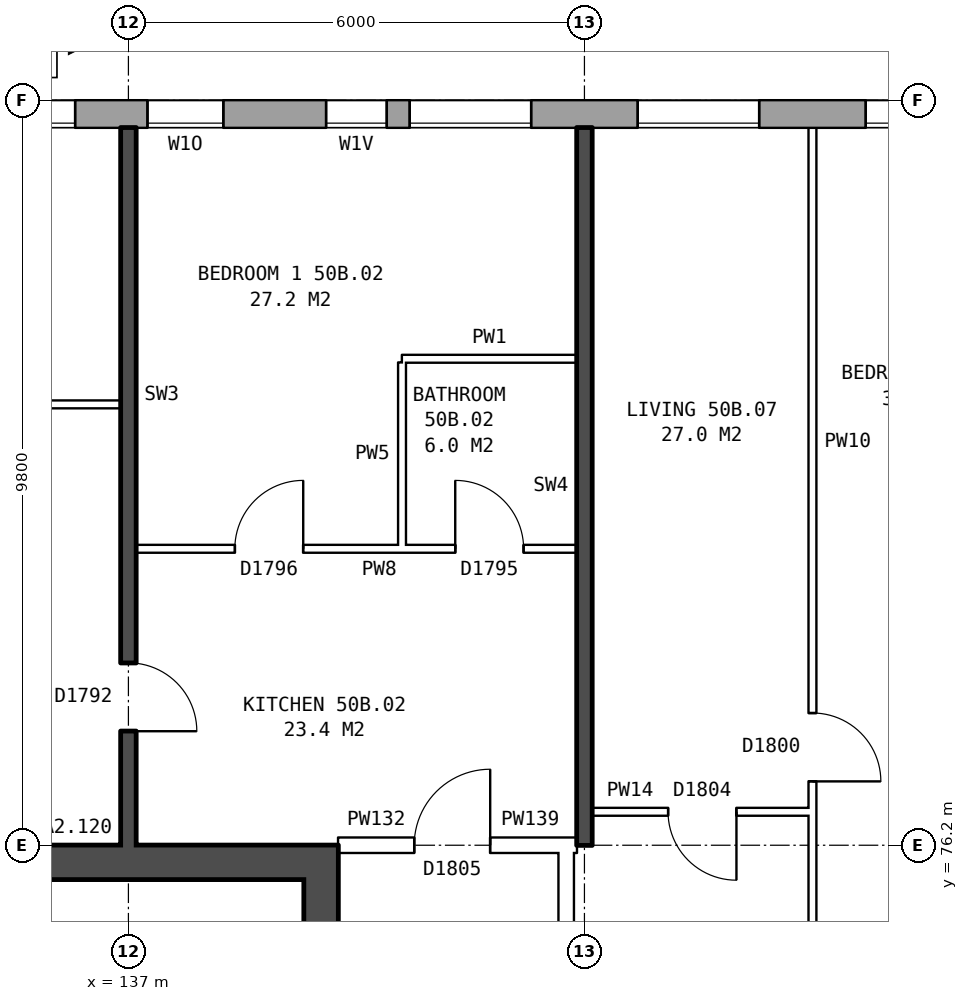
"""IFC4 building model, lengths in metres.
Left out: names, types, materials, properties, quantities, classifications, styles, units other than length and angle.
Written with IfcOpenShell. Run it as: python <this file> out.ifc"""

import sys

from ifc_helpers import new_model, si_unit, direction, frame, frame_2d, origin, place, context, subcontext, project, spatial, rectangle, extrude, element, fill, save


model = new_model("IFC4")
c1 = context("Model", 3, precision=1e-05, world=origin(), true_north=direction((0.0, 1.0)))
c2 = subcontext(c1, "Body", "Model", "MODEL_VIEW")
j1 = project(units=[si_unit("LENGTHUNIT", "METRE"), si_unit("PLANEANGLEUNIT", "RADIAN")], contexts=[c1])
p1 = place(None, origin())
s1 = spatial("IfcSite", under=j1, at=p1, CompositionType="ELEMENT")
p2 = place(p1, origin())
s2 = spatial("IfcBuilding", under=s1, at=p2, CompositionType="ELEMENT")
p3 = place(p2, frame((0.0, 0.0, 178.9)))
s3 = spatial("IfcBuildingStorey", under=s2, at=p3, CompositionType="ELEMENT", Elevation=178.9)
p4 = place(p3, frame((167.175, 85.82, 0.0), z_axis=(0.0, 0.0, 1.0), x_axis=(-1.0, 0.0, 0.0)))
e1 = element("IfcWall", 1, at=p4, inside=s3, PredefinedType="STANDARD", context=c2, shape_type="SweptSolid", body=[
    extrude(rectangle(XDim=33.101, YDim=0.36, at=frame_2d((16.55, 0.0))), origin(), (0.0, 0.0, 1.0), 2.85),
])
p5 = place(p4, frame((0.875, 0.0, 0.8)))
e2 = element("IfcOpeningElement", 2, at=p5, cuts=e1, PredefinedType="OPENING", context=c2, shape_type="SweptSolid", body=[
    extrude(rectangle(XDim=1.6, YDim=1.8, at=frame_2d((0.8, 0.9))), frame((0.0, 0.19, 0.0), z_axis=(0.0, -1.0, 0.0), x_axis=(1.0, 0.0, 0.0)), (0.0, 0.0, 1.0), 0.38),
])
p6 = place(p4, frame((2.8, 0.0, 1.4)))
e3 = element("IfcOpeningElement", 3, at=p6, cuts=e1, PredefinedType="OPENING", context=c2, shape_type="SweptSolid", body=[
    extrude(rectangle(XDim=1.4, YDim=1.2, at=frame_2d((0.7, 0.6))), frame((0.0, 0.19, 0.0), z_axis=(0.0, -1.0, 0.0), x_axis=(1.0, 0.0, 0.0)), (0.0, 0.0, 1.0), 0.38),
])
p7 = place(p4, frame((6.875, 0.0, 0.8)))
e4 = element("IfcOpeningElement", 4, at=p7, cuts=e1, PredefinedType="OPENING", context=c2, shape_type="SweptSolid", body=[
    extrude(rectangle(XDim=1.6, YDim=1.8, at=frame_2d((0.8, 0.9))), frame((0.0, 0.19, 0.0), z_axis=(0.0, -1.0, 0.0), x_axis=(1.0, 0.0, 0.0)), (0.0, 0.0, 1.0), 0.38),
])
p8 = place(p4, frame((9.875, 0.0, 0.8)))
e5 = element("IfcOpeningElement", 5, at=p8, cuts=e1, PredefinedType="OPENING", context=c2, shape_type="SweptSolid", body=[
    extrude(rectangle(XDim=1.6, YDim=1.8, at=frame_2d((0.8, 0.9))), frame((0.0, 0.19, 0.0), z_axis=(0.0, -1.0, 0.0), x_axis=(1.0, 0.0, 0.0)), (0.0, 0.0, 1.0), 0.38),
])
p9 = place(p4, frame((12.875, 0.0, 0.8)))
e6 = element("IfcOpeningElement", 6, at=p9, cuts=e1, PredefinedType="OPENING", context=c2, shape_type="SweptSolid", body=[
    extrude(rectangle(XDim=1.6, YDim=1.8, at=frame_2d((0.8, 0.9))), frame((0.0, 0.19, 0.0), z_axis=(0.0, -1.0, 0.0), x_axis=(1.0, 0.0, 0.0)), (0.0, 0.0, 1.0), 0.38),
])
p10 = place(p4, frame((15.875, 0.0, 0.8)))
e7 = element("IfcOpeningElement", 7, at=p10, cuts=e1, PredefinedType="OPENING", context=c2, shape_type="SweptSolid", body=[
    extrude(rectangle(XDim=1.6, YDim=1.8, at=frame_2d((0.8, 0.9))), frame((0.0, 0.19, 0.0), z_axis=(0.0, -1.0, 0.0), x_axis=(1.0, 0.0, 0.0)), (0.0, 0.0, 1.0), 0.38),
])
p11 = place(p4, frame((18.875, 0.0, 0.8)))
e8 = element("IfcOpeningElement", 8, at=p11, cuts=e1, PredefinedType="OPENING", context=c2, shape_type="SweptSolid", body=[
    extrude(rectangle(XDim=1.6, YDim=1.8, at=frame_2d((0.8, 0.9))), frame((0.0, 0.19, 0.0), z_axis=(0.0, -1.0, 0.0), x_axis=(1.0, 0.0, 0.0)), (0.0, 0.0, 1.0), 0.38),
])
p12 = place(p4, frame((21.875, 0.0, 0.8)))
e9 = element("IfcOpeningElement", 9, at=p12, cuts=e1, PredefinedType="OPENING", context=c2, shape_type="SweptSolid", body=[
    extrude(rectangle(XDim=1.6, YDim=1.8, at=frame_2d((0.8, 0.9))), frame((0.0, 0.19, 0.0), z_axis=(0.0, -1.0, 0.0), x_axis=(1.0, 0.0, 0.0)), (0.0, 0.0, 1.0), 0.38),
])
p13 = place(p4, frame((24.875, 0.0, 0.8)))
e10 = element("IfcOpeningElement", 10, at=p13, cuts=e1, PredefinedType="OPENING", context=c2, shape_type="SweptSolid", body=[
    extrude(rectangle(XDim=1.6, YDim=1.8, at=frame_2d((0.8, 0.9))), frame((0.0, 0.19, 0.0), z_axis=(0.0, -1.0, 0.0), x_axis=(1.0, 0.0, 0.0)), (0.0, 0.0, 1.0), 0.38),
])
p14 = place(p4, frame((26.775, 0.0, 0.8)))
e11 = element("IfcOpeningElement", 11, at=p14, cuts=e1, PredefinedType="OPENING", context=c2, shape_type="SweptSolid", body=[
    extrude(rectangle(XDim=0.8, YDim=0.9, at=frame_2d((0.4, 0.45))), frame((0.0, 0.19, 0.0), z_axis=(0.0, -1.0, 0.0), x_axis=(1.0, 0.0, 0.0)), (0.0, 0.0, 1.0), 0.38),
])
p15 = place(p4, frame((30.875, 0.0, 0.8)))
e12 = element("IfcOpeningElement", 12, at=p15, cuts=e1, PredefinedType="OPENING", context=c2, shape_type="SweptSolid", body=[
    extrude(rectangle(XDim=1.6, YDim=1.8, at=frame_2d((0.8, 0.9))), frame((0.0, 0.19, 0.0), z_axis=(0.0, -1.0, 0.0), x_axis=(1.0, 0.0, 0.0)), (0.0, 0.0, 1.0), 0.38),
])
p16 = place(p4, frame((28.925, 0.0, 1.4)))
e13 = element("IfcOpeningElement", 13, at=p16, cuts=e1, PredefinedType="OPENING", context=c2, shape_type="SweptSolid", body=[
    extrude(rectangle(XDim=1.0, YDim=1.2, at=frame_2d((0.5, 0.6))), frame((0.0, 0.19, 0.0), z_axis=(0.0, -1.0, 0.0), x_axis=(1.0, 0.0, 0.0)), (0.0, 0.0, 1.0), 0.38),
])
p17 = place(p3, frame((139.535, 63.8, 0.0), z_axis=(0.0, 0.0, 1.0), x_axis=(0.0, 1.0, 0.0)))
e14 = element("IfcWall", 14, at=p17, inside=s3, PredefinedType="SHEAR", context=c2, shape_type="SweptSolid", body=[
    extrude(rectangle(XDim=12.4, YDim=0.45, at=frame_2d((6.2, 0.0))), origin(), (0.0, 0.0, 1.0), 2.85),
])
p18 = place(p17, frame((1.325, 0.0, 0.0)))
e15 = element("IfcOpeningElement", 15, at=p18, cuts=e14, PredefinedType="OPENING", context=c2, shape_type="SweptSolid", body=[
    extrude(rectangle(XDim=1.1, YDim=2.1, at=frame_2d((0.55, 1.05))), frame((0.0, 0.235, 0.0), z_axis=(0.0, -1.0, 0.0), x_axis=(1.0, 0.0, 0.0)), (0.0, 0.0, 1.0), 0.47),
])
p19 = place(p17, frame((3.6, 0.0, 0.0)))
e16 = element("IfcOpeningElement", 16, at=p19, cuts=e14, PredefinedType="OPENING", context=c2, shape_type="SweptSolid", body=[
    extrude(rectangle(XDim=1.1, YDim=2.1, at=frame_2d((0.55, 1.05))), frame((0.0, 0.235, 0.0), z_axis=(0.0, -1.0, 0.0), x_axis=(1.0, 0.0, 0.0)), (0.0, 0.0, 1.0), 0.47),
])
p20 = place(p17, frame((5.8, 0.0, 0.0)))
e17 = element("IfcOpeningElement", 17, at=p20, cuts=e14, PredefinedType="OPENING", context=c2, shape_type="SweptSolid", body=[
    extrude(rectangle(XDim=1.1, YDim=2.1, at=frame_2d((0.55, 1.05))), frame((0.0, 0.235, 0.0), z_axis=(0.0, -1.0, 0.0), x_axis=(1.0, 0.0, 0.0)), (0.0, 0.0, 1.0), 0.47),
])
p21 = place(p17, frame((9.9, 0.0, 0.0)))
e18 = element("IfcOpeningElement", 18, at=p21, cuts=e14, PredefinedType="OPENING", context=c2, shape_type="SweptSolid", body=[
    extrude(rectangle(XDim=1.1, YDim=2.1, at=frame_2d((0.55, 1.05))), frame((0.0, 0.235, 0.0), z_axis=(0.0, -1.0, 0.0), x_axis=(1.0, 0.0, 0.0)), (0.0, 0.0, 1.0), 0.47),
])
p22 = place(p17, frame((8.125, 0.0, 0.0)))
e19 = element("IfcOpeningElement", 19, at=p22, cuts=e14, PredefinedType="OPENING", context=c2, shape_type="SweptSolid", body=[
    extrude(rectangle(XDim=0.85, YDim=2.1, at=frame_2d((0.425, 1.05))), frame((0.0, 0.235, 0.0), z_axis=(0.0, -1.0, 0.0), x_axis=(1.0, 0.0, 0.0)), (0.0, 0.0, 1.0), 0.47),
])
p23 = place(p3, frame((139.31, 75.975, 0.0), z_axis=(0.0, 0.0, 1.0), x_axis=(-1.0, 0.0, 0.0)))
e20 = element("IfcWall", 20, at=p23, inside=s3, PredefinedType="SHEAR", context=c2, shape_type="SweptSolid", body=[
    extrude(rectangle(XDim=7.5, YDim=0.45, at=frame_2d((3.75, 0.0))), origin(), (0.0, 0.0, 1.0), 2.85),
])
p24 = place(p3, frame((142.76, 63.9, 0.0), z_axis=(0.0, 0.0, 1.0), x_axis=(0.0, 1.0, 0.0)))
e21 = element("IfcWall", 21, at=p24, inside=s3, PredefinedType="PARTITIONING", context=c2, shape_type="SweptSolid", body=[
    extrude(rectangle(XDim=12.2, YDim=0.2, at=frame_2d((6.1, 0.0))), origin(), (0.0, 0.0, 1.0), 2.85),
])
p25 = place(p24, frame((5.1, 0.0, 0.0)))
e22 = element("IfcOpeningElement", 22, at=p25, cuts=e21, PredefinedType="OPENING", context=c2, shape_type="SweptSolid", body=[
    extrude(rectangle(XDim=2.0, YDim=2.1, at=frame_2d((1.0, 1.05))), frame((0.0, 0.11, 0.0), z_axis=(0.0, -1.0, 0.0), x_axis=(1.0, 0.0, 0.0)), (0.0, 0.0, 1.0), 0.22),
])
p26 = place(p3, frame((139.76, 76.2, 0.0), z_axis=(0.0, 0.0, 1.0), x_axis=(1.0, 0.0, 0.0)))
e23 = element("IfcWall", 23, at=p26, inside=s3, PredefinedType="PARTITIONING", context=c2, shape_type="SweptSolid", body=[
    extrude(rectangle(XDim=3.0, YDim=0.2, at=frame_2d((1.5, 0.0))), origin(), (0.0, 0.0, 1.0), 2.85),
])
p27 = place(p26, frame((1.0, 0.0, 0.0)))
e24 = element("IfcOpeningElement", 24, at=p27, cuts=e23, PredefinedType="OPENING", context=c2, shape_type="SweptSolid", body=[
    extrude(rectangle(XDim=1.0, YDim=2.1, at=frame_2d((0.5, 1.05))), frame((0.0, 0.11, 0.0), z_axis=(0.0, -1.0, 0.0), x_axis=(1.0, 0.0, 0.0)), (0.0, 0.0, 1.0), 0.22),
])
p28 = place(p3, frame((142.76, 76.2, 0.0), z_axis=(0.0, 0.0, 1.0), x_axis=(1.0, 0.0, 0.0)))
e25 = element("IfcWall", 25, at=p28, inside=s3, PredefinedType="PARTITIONING", context=c2, shape_type="SweptSolid", body=[
    extrude(rectangle(XDim=0.14, YDim=0.2, at=frame_2d((0.07, 0.0))), origin(), (0.0, 0.0, 1.0), 2.85),
])
p29 = place(p3, frame((143.1, 76.64, 0.0), z_axis=(0.0, 0.0, 1.0), x_axis=(1.0, 0.0, 0.0)))
e26 = element("IfcWall", 26, at=p29, inside=s3, PredefinedType="PARTITIONING", context=c2, shape_type="SweptSolid", body=[
    extrude(rectangle(XDim=2.9, YDim=0.1, at=frame_2d((1.45, 0.0))), origin(), (0.0, 0.0, 1.0), 2.85),
])
p30 = place(p29, frame((1.0, 0.0, 0.0)))
e27 = element("IfcOpeningElement", 27, at=p30, cuts=e26, PredefinedType="OPENING", context=c2, shape_type="SweptSolid", body=[
    extrude(rectangle(XDim=0.9, YDim=2.1, at=frame_2d((0.45, 1.05))), frame((0.0, 0.06, 0.0), z_axis=(0.0, -1.0, 0.0), x_axis=(1.0, 0.0, 0.0)), (0.0, 0.0, 1.0), 0.12),
])
p31 = place(p3, frame((137.1, 80.1, 0.0), z_axis=(0.0, 0.0, 1.0), x_axis=(1.0, 0.0, 0.0)))
e28 = element("IfcWall", 28, at=p31, inside=s3, PredefinedType="PARTITIONING", context=c2, shape_type="SweptSolid", body=[
    extrude(rectangle(XDim=5.8, YDim=0.1, at=frame_2d((2.9, 0.0))), origin(), (0.0, 0.0, 1.0), 2.85),
])
p32 = place(p31, frame((1.3, 0.0, 0.0)))
e29 = element("IfcOpeningElement", 29, at=p32, cuts=e28, PredefinedType="OPENING", context=c2, shape_type="SweptSolid", body=[
    extrude(rectangle(XDim=0.9, YDim=2.1, at=frame_2d((0.45, 1.05))), frame((0.0, 0.06, 0.0), z_axis=(0.0, -1.0, 0.0), x_axis=(1.0, 0.0, 0.0)), (0.0, 0.0, 1.0), 0.12),
])
p33 = place(p31, frame((4.2, 0.0, 0.0)))
e30 = element("IfcOpeningElement", 30, at=p33, cuts=e28, PredefinedType="OPENING", context=c2, shape_type="SweptSolid", body=[
    extrude(rectangle(XDim=0.9, YDim=2.1, at=frame_2d((0.45, 1.05))), frame((0.0, 0.06, 0.0), z_axis=(0.0, -1.0, 0.0), x_axis=(1.0, 0.0, 0.0)), (0.0, 0.0, 1.0), 0.12),
])
p34 = place(p3, frame((131.36, 82.0, 0.0), z_axis=(0.0, 0.0, 1.0), x_axis=(1.0, 0.0, 0.0)))
e31 = element("IfcWall", 31, at=p34, inside=s3, PredefinedType="PARTITIONING", context=c2, shape_type="SweptSolid", body=[
    extrude(rectangle(XDim=5.54, YDim=0.1, at=frame_2d((2.77, 0.0))), origin(), (0.0, 0.0, 1.0), 2.85),
])
p35 = place(p34, frame((2.32, 0.0, 0.0)))
e32 = element("IfcOpeningElement", 32, at=p35, cuts=e31, PredefinedType="OPENING", context=c2, shape_type="SweptSolid", body=[
    extrude(rectangle(XDim=0.9, YDim=2.1, at=frame_2d((0.45, 1.05))), frame((0.0, 0.06, 0.0), z_axis=(0.0, -1.0, 0.0), x_axis=(1.0, 0.0, 0.0)), (0.0, 0.0, 1.0), 0.12),
])
p36 = place(p3, frame((140.6, 82.6, 0.0), z_axis=(0.0, 0.0, 1.0), x_axis=(1.0, 0.0, 0.0)))
e33 = element("IfcWall", 33, at=p36, inside=s3, PredefinedType="PARTITIONING", context=c2, shape_type="SweptSolid", body=[
    extrude(rectangle(XDim=2.3, YDim=0.1, at=frame_2d((1.15, 0.0))), origin(), (0.0, 0.0, 1.0), 2.85),
])
p37 = place(p3, frame((137.0, 76.2, 0.0), z_axis=(0.0, 0.0, 1.0), x_axis=(0.0, 1.0, 0.0)))
e34 = element("IfcWall", 34, at=p37, inside=s3, PredefinedType="SOLIDWALL", context=c2, shape_type="SweptSolid", body=[
    extrude(rectangle(XDim=9.44, YDim=0.2, at=frame_2d((4.72, 0.0))), origin(), (0.0, 0.0, 1.0), 2.85),
])
p38 = place(p37, frame((1.5, 0.0, 0.0)))
e35 = element("IfcOpeningElement", 35, at=p38, cuts=e34, PredefinedType="OPENING", context=c2, shape_type="SweptSolid", body=[
    extrude(rectangle(XDim=0.9, YDim=2.1, at=frame_2d((0.45, 1.05))), frame((0.0, 0.11, 0.0), z_axis=(0.0, -1.0, 0.0), x_axis=(1.0, 0.0, 0.0)), (0.0, 0.0, 1.0), 0.22),
])
p39 = place(p3, frame((140.6, 80.15, 0.0), z_axis=(0.0, 0.0, 1.0), x_axis=(0.0, 1.0, 0.0)))
e36 = element("IfcWall", 36, at=p39, inside=s3, PredefinedType="PARTITIONING", context=c2, shape_type="SweptSolid", body=[
    extrude(rectangle(XDim=2.4, YDim=0.1, at=frame_2d((1.2, 0.0))), origin(), (0.0, 0.0, 1.0), 2.85),
])
p40 = place(p3, frame((143.0, 76.2, 0.0), z_axis=(0.0, 0.0, 1.0), x_axis=(0.0, 1.0, 0.0)))
e37 = element("IfcWall", 37, at=p40, inside=s3, PredefinedType="SOLIDWALL", context=c2, shape_type="SweptSolid", body=[
    extrude(rectangle(XDim=9.44, YDim=0.2, at=frame_2d((4.72, 0.0))), origin(), (0.0, 0.0, 1.0), 2.85),
])
p41 = place(p3, frame((146.0, 71.3, 0.0), z_axis=(0.0, 0.0, 1.0), x_axis=(0.0, 1.0, 0.0)))
e38 = element("IfcWall", 38, at=p41, inside=s3, PredefinedType="PARTITIONING", context=c2, shape_type="SweptSolid", body=[
    extrude(rectangle(XDim=14.34, YDim=0.1, at=frame_2d((7.17, 0.0))), origin(), (0.0, 0.0, 1.0), 2.85),
])
p42 = place(p41, frame((5.74, 0.0, 0.0)))
e39 = element("IfcOpeningElement", 39, at=p42, cuts=e38, PredefinedType="OPENING", context=c2, shape_type="SweptSolid", body=[
    extrude(rectangle(XDim=0.9, YDim=2.1, at=frame_2d((0.45, 1.05))), frame((0.0, 0.06, 0.0), z_axis=(0.0, -1.0, 0.0), x_axis=(1.0, 0.0, 0.0)), (0.0, 0.0, 1.0), 0.12),
])
p43 = place(p41, frame((0.4, 0.0, 0.0)))
e40 = element("IfcOpeningElement", 40, at=p43, cuts=e38, PredefinedType="OPENING", context=c2, shape_type="SweptSolid", body=[
    extrude(rectangle(XDim=0.9, YDim=2.1, at=frame_2d((0.45, 1.05))), frame((0.0, 0.06, 0.0), z_axis=(0.0, -1.0, 0.0), x_axis=(1.0, 0.0, 0.0)), (0.0, 0.0, 1.0), 0.12),
])
p44 = place(p11, origin())
e41 = element("IfcWindow", 41, at=p44, inside=s3, PartitioningType="SINGLE_PANEL", PredefinedType="WINDOW", context=c2, shape_type="SweptSolid", body=[
    extrude(rectangle(XDim=1.6, YDim=1.8, at=frame_2d((0.8, 0.9))), frame((0.0, 0.15, 0.0), z_axis=(0.0, -1.0, 0.0), x_axis=(1.0, 0.0, 0.0)), (0.0, 0.0, 1.0), 0.06),
])
fill(e8, e41)
p45 = place(p12, origin())
e42 = element("IfcWindow", 42, at=p45, inside=s3, PartitioningType="SINGLE_PANEL", PredefinedType="WINDOW", context=c2, shape_type="SweptSolid", body=[
    extrude(rectangle(XDim=1.6, YDim=1.8, at=frame_2d((0.8, 0.9))), frame((0.0, 0.15, 0.0), z_axis=(0.0, -1.0, 0.0), x_axis=(1.0, 0.0, 0.0)), (0.0, 0.0, 1.0), 0.06),
])
fill(e9, e42)
p46 = place(p13, origin())
e43 = element("IfcWindow", 43, at=p46, inside=s3, PartitioningType="SINGLE_PANEL", PredefinedType="WINDOW", context=c2, shape_type="SweptSolid", body=[
    extrude(rectangle(XDim=1.6, YDim=1.8, at=frame_2d((0.8, 0.9))), frame((0.0, 0.15, 0.0), z_axis=(0.0, -1.0, 0.0), x_axis=(1.0, 0.0, 0.0)), (0.0, 0.0, 1.0), 0.06),
])
fill(e10, e43)
p47 = place(p14, origin())
e44 = element("IfcWindow", 44, at=p47, inside=s3, PartitioningType="SINGLE_PANEL", PredefinedType="WINDOW", context=c2, shape_type="SweptSolid", body=[
    extrude(rectangle(XDim=0.8, YDim=0.9, at=frame_2d((0.4, 0.45))), frame((0.0, 0.15, 0.0), z_axis=(0.0, -1.0, 0.0), x_axis=(1.0, 0.0, 0.0)), (0.0, 0.0, 1.0), 0.06),
])
fill(e11, e44)
p48 = place(p15, origin())
e45 = element("IfcWindow", 45, at=p48, inside=s3, PartitioningType="SINGLE_PANEL", PredefinedType="WINDOW", context=c2, shape_type="SweptSolid", body=[
    extrude(rectangle(XDim=1.6, YDim=1.8, at=frame_2d((0.8, 0.9))), frame((0.0, 0.15, 0.0), z_axis=(0.0, -1.0, 0.0), x_axis=(1.0, 0.0, 0.0)), (0.0, 0.0, 1.0), 0.06),
])
fill(e12, e45)
p49 = place(p32, origin())
e46 = element("IfcDoor", 46, at=p49, inside=s3, OperationType="SINGLE_SWING_RIGHT", PredefinedType="DOOR", context=c2, shape_type="SweptSolid", body=[
    extrude(rectangle(XDim=0.9, YDim=2.1, at=frame_2d((0.45, 1.05))), frame((0.0, 0.025, 0.0), z_axis=(0.0, -1.0, 0.0), x_axis=(1.0, 0.0, 0.0)), (0.0, 0.0, 1.0), 0.05),
])
fill(e29, e46)
p50 = place(p27, origin())
e47 = element("IfcDoor", 47, at=p50, inside=s3, OperationType="SINGLE_SWING_RIGHT", PredefinedType="DOOR", context=c2, shape_type="SweptSolid", body=[
    extrude(rectangle(XDim=1.0, YDim=2.1, at=frame_2d((0.5, 1.05))), frame((0.0, 0.025, 0.0), z_axis=(0.0, -1.0, 0.0), x_axis=(1.0, 0.0, 0.0)), (0.0, 0.0, 1.0), 0.05),
])
fill(e24, e47)
p51 = place(p38, frame((0.9, 0.0, 0.0), z_axis=(0.0, 0.0, 1.0), x_axis=(-1.0, 0.0, 0.0)))
e48 = element("IfcDoor", 48, at=p51, inside=s3, OperationType="SINGLE_SWING_RIGHT", PredefinedType="DOOR", context=c2, shape_type="SweptSolid", body=[
    extrude(rectangle(XDim=0.9, YDim=2.1, at=frame_2d((0.45, 1.05))), frame((0.0, 0.025, 0.0), z_axis=(0.0, -1.0, 0.0), x_axis=(1.0, 0.0, 0.0)), (0.0, 0.0, 1.0), 0.05),
])
fill(e35, e48)
p52 = place(p33, origin())
e49 = element("IfcDoor", 49, at=p52, inside=s3, OperationType="SINGLE_SWING_LEFT", PredefinedType="DOOR", context=c2, shape_type="SweptSolid", body=[
    extrude(rectangle(XDim=0.9, YDim=2.1, at=frame_2d((0.45, 1.05))), frame((0.0, 0.025, 0.0), z_axis=(0.0, -1.0, 0.0), x_axis=(1.0, 0.0, 0.0)), (0.0, 0.0, 1.0), 0.05),
])
fill(e30, e49)
p53 = place(p42, frame((0.9, 0.0, 0.0), z_axis=(0.0, 0.0, 1.0), x_axis=(-1.0, 0.0, 0.0)))
e50 = element("IfcDoor", 50, at=p53, inside=s3, OperationType="SINGLE_SWING_RIGHT", PredefinedType="DOOR", context=c2, shape_type="SweptSolid", body=[
    extrude(rectangle(XDim=0.9, YDim=2.1, at=frame_2d((0.45, 1.05))), frame((0.0, 0.025, 0.0), z_axis=(0.0, -1.0, 0.0), x_axis=(1.0, 0.0, 0.0)), (0.0, 0.0, 1.0), 0.05),
])
fill(e39, e50)
p54 = place(p30, frame((0.9, 0.0, 0.0), z_axis=(0.0, 0.0, 1.0), x_axis=(-1.0, 0.0, 0.0)))
e51 = element("IfcDoor", 51, at=p54, inside=s3, OperationType="SINGLE_SWING_LEFT", PredefinedType="DOOR", context=c2, shape_type="SweptSolid", body=[
    extrude(rectangle(XDim=0.9, YDim=2.1, at=frame_2d((0.45, 1.05))), frame((0.0, 0.025, 0.0), z_axis=(0.0, -1.0, 0.0), x_axis=(1.0, 0.0, 0.0)), (0.0, 0.0, 1.0), 0.05),
])
fill(e27, e51)
p55 = place(p16, origin())
e52 = element("IfcWindow", 52, at=p55, inside=s3, PartitioningType="SINGLE_PANEL", PredefinedType="WINDOW", context=c2, shape_type="SweptSolid", body=[
    extrude(rectangle(XDim=1.0, YDim=1.2, at=frame_2d((0.5, 0.6))), frame((0.0, 0.15, 0.0), z_axis=(0.0, -1.0, 0.0), x_axis=(1.0, 0.0, 0.0)), (0.0, 0.0, 1.0), 0.06),
])
fill(e13, e52)
save(model, sys.argv[1])
